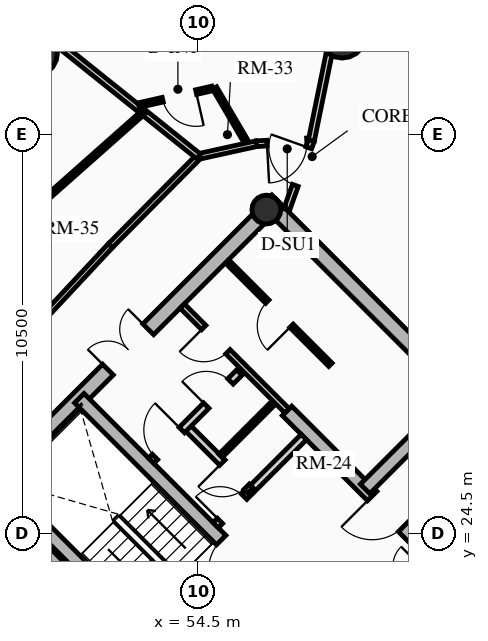
"""IFC4 building model, lengths in metres.
Left out: names, types, materials, properties, quantities, classifications, styles, units other than length and angle.
Written with IfcOpenShell. Run it as: python <this file> out.ifc"""

import sys

from ifc_helpers import new_model, si_unit, direction, frame, frame_2d, origin, origin_2d, place, context, subcontext, project, spatial, rectangle, circle, hollow_circle, extrude, source, transform, mapped, element, fill, save


model = new_model("IFC4")
c1 = context("Model", 3, precision=1e-05, world=origin(), true_north=direction((0.0, 1.0)))
c2 = subcontext(c1, "Body", "Model", "MODEL_VIEW")
j1 = project(units=[si_unit("LENGTHUNIT", "METRE"), si_unit("PLANEANGLEUNIT", "RADIAN")], contexts=[c1])
p1 = place(None, origin())
s1 = spatial("IfcSite", under=j1, at=p1, CompositionType="ELEMENT")
p2 = place(p1, origin())
s2 = spatial("IfcBuilding", under=s1, at=p2, CompositionType="ELEMENT")
p3 = place(p2, frame((0.0, 0.0, 169.06)))
s3 = spatial("IfcBuildingStorey", under=s2, at=p3, CompositionType="ELEMENT", Elevation=169.06)
for number, where, z_axis, x_axis in (
    (1, (58.702, 15.732, 0.0), (0.0, 0.0, 1.0), (-0.707, 0.707, 0.0)),
    (2, (66.268, 23.298, 0.0), (0.0, 0.0, 1.0), (-0.707, 0.707, 0.0)),
):
    element("IfcWall", number, at=place(p3, frame(where, z_axis=z_axis, x_axis=x_axis)), inside=s3, PredefinedType="SHEAR", context=c2, shape_type="SweptSolid", body=[
        extrude(rectangle(XDim=14.1, YDim=0.4, at=frame_2d((7.05, 0.0))), origin(), (0.0, 0.0, 1.0), 2.91),
    ])
p4 = place(p3, frame((48.873, 25.561, 0.0), z_axis=(0.0, 0.0, 1.0), x_axis=(0.707106781187, 0.707106781187, 0.0)))
e3 = element("IfcWall", 3, at=p4, inside=s3, PredefinedType="SHEAR", context=c2, shape_type="SweptSolid", body=[
    extrude(rectangle(XDim=10.7, YDim=0.4, at=frame_2d((5.35, 0.0))), origin(), (0.0, 0.0, 1.0), 2.91),
])
m1 = source(origin(), c2, "Body", "SweptSolid", [
    extrude(rectangle(XDim=1.5, YDim=2.02, at=frame_2d((0.75, 1.01))), frame((0.0, 0.21, 0.0), z_axis=(0.0, -1.0, 0.0), x_axis=(1.0, 0.0, 0.0)), (0.0, 0.0, 1.0), 0.42),
])
p5 = place(p4, frame((4.6, 0.0, 0.0)))
e4 = element("IfcOpeningElement", 4, at=p5, cuts=e3, PredefinedType="OPENING", context=c2, shape_type="MappedRepresentation", body=[
    mapped(m1, transform((0.0, 0.0, 0.0), x_axis=(1.0, 0.0, 0.0), y_axis=(0.0, 1.0, 0.0), z_axis=(0.0, 0.0, 1.0), scale=1.0)),
])
p6 = place(p3, frame((61.06, 18.373, 0.0), z_axis=(0.0, 0.0, 1.0), x_axis=(-0.707106781187, 0.707106781187, 0.0)))
e5 = element("IfcWall", 5, at=p6, inside=s3, PredefinedType="SHEAR", context=c2, shape_type="SweptSolid", body=[
    extrude(rectangle(XDim=13.7, YDim=0.35, at=frame_2d((6.85, 0.0))), origin(), (0.0, 0.0, 1.0), 2.91),
])
m2 = source(origin(), c2, "Body", "SweptSolid", [
    extrude(rectangle(XDim=1.1, YDim=2.015, at=frame_2d((0.55, 1.007))), frame((0.0, 0.185, 0.0), z_axis=(0.0, -1.0, 0.0), x_axis=(1.0, 0.0, 0.0)), (0.0, 0.0, 1.0), 0.37),
])
p7 = place(p6, frame((4.85, 0.0, 0.0)))
e6 = element("IfcOpeningElement", 6, at=p7, cuts=e5, PredefinedType="OPENING", context=c2, shape_type="MappedRepresentation", body=[
    mapped(m2, transform((0.0, 0.0, 0.0), x_axis=(1.0, 0.0, 0.0), y_axis=(0.0, 1.0, 0.0), z_axis=(0.0, 0.0, 1.0), scale=1.0)),
])
p8 = place(p6, frame((0.625, 0.0, 0.0)))
e7 = element("IfcOpeningElement", 7, at=p8, cuts=e5, PredefinedType="OPENING", context=c2, shape_type="MappedRepresentation", body=[
    mapped(m2, transform((0.0, 0.0, 0.0), x_axis=(1.0, 0.0, 0.0), y_axis=(0.0, 1.0, 0.0), z_axis=(0.0, 0.0, 1.0), scale=1.0)),
])
p9 = place(p6, frame((2.625, 0.0, 0.0)))
e8 = element("IfcOpeningElement", 8, at=p9, cuts=e5, PredefinedType="OPENING", context=c2, shape_type="MappedRepresentation", body=[
    mapped(m2, transform((0.0, 0.0, 0.0), x_axis=(1.0, 0.0, 0.0), y_axis=(0.0, 1.0, 0.0), z_axis=(0.0, 0.0, 1.0), scale=1.0)),
])
m3 = source(origin(), c2, "Body", "SweptSolid", [
    extrude(rectangle(XDim=1.15, YDim=2.02, at=frame_2d((0.575, 1.01))), frame((0.0, 0.185, 0.0), z_axis=(0.0, -1.0, 0.0), x_axis=(1.0, 0.0, 0.0)), (0.0, 0.0, 1.0), 0.37),
])
p10 = place(p6, frame((7.27, 0.0, 0.0)))
e9 = element("IfcOpeningElement", 9, at=p10, cuts=e5, PredefinedType="OPENING", context=c2, shape_type="MappedRepresentation", body=[
    mapped(m3, transform((0.0, 0.0, 0.0), x_axis=(1.0, 0.0, 0.0), y_axis=(0.0, 1.0, 0.0), z_axis=(0.0, 0.0, 1.0), scale=1.0)),
])
p11 = place(p3, frame((63.627, 20.94, 0.0), z_axis=(0.0, 0.0, 1.0), x_axis=(-0.707119496762, 0.707094065383, 0.0)))
e10 = element("IfcWall", 10, at=p11, inside=s3, PredefinedType="SHEAR", context=c2, shape_type="SweptSolid", body=[
    extrude(rectangle(XDim=9.6, YDim=0.35, at=frame_2d((4.8, 0.0))), origin(), (0.0, 0.0, 1.0), 2.91),
])
p12 = place(p11, frame((5.28, 0.0, 0.0)))
e11 = element("IfcOpeningElement", 11, at=p12, cuts=e10, PredefinedType="OPENING", context=c2, shape_type="MappedRepresentation", body=[
    mapped(m3, transform((0.0, 0.0, 0.0), x_axis=(1.0, 0.0, 0.0), y_axis=(0.0, 1.0, 0.0), z_axis=(0.0, 0.0, 1.0), scale=1.0)),
])
p13 = place(p3, frame((53.922, 21.141, 0.0), z_axis=(0.0, 0.0, 1.0), x_axis=(-0.707106781187, 0.707106781187, 0.0)))
e12 = element("IfcWall", 12, at=p13, inside=s3, PredefinedType="SHEAR", context=c2, shape_type="SweptSolid", body=[
    extrude(rectangle(XDim=6.695, YDim=0.35, at=frame_2d((3.348, 0.0))), origin(), (0.0, 0.0, 1.0), 2.91),
])
p14 = place(p3, frame((58.893, 25.674, 0.0), z_axis=(0.0, 0.0, 1.0), x_axis=(0.707106781187, 0.707106781187, 0.0)))
e13 = element("IfcWall", 13, at=p14, inside=s3, PredefinedType="SHEAR", context=c2, shape_type="SweptSolid", body=[
    extrude(rectangle(XDim=3.285, YDim=0.35, at=frame_2d((1.643, 0.0))), origin(), (0.0, 0.0, 1.0), 2.91),
])
p15 = place(p3, frame((56.294, 33.024, 0.0), z_axis=(0.0, 0.0, 1.0), x_axis=(0.707106781187, 0.707106781187, 0.0)))
e14 = element("IfcColumn", 14, at=p15, inside=s3, PredefinedType="COLUMN", context=c2, shape_type="SweptSolid", body=[
    extrude(hollow_circle(Radius=0.38, WallThickness=0.032, at=origin_2d()), origin(), (0.0, 0.0, 1.0), 2.91),
])
for number, where, z_axis, x_axis in (
    (15, (58.291, 37.635, 0.0), (0.0, 0.0, 1.0), (1.0, 0.0, 0.0)),
    (16, (50.173, 37.146, 0.0), (0.0, 0.0, 1.0), (1.0, 0.0, 0.0)),
):
    element("IfcColumn", number, at=place(p3, frame(where, z_axis=z_axis, x_axis=x_axis)), inside=s3, PredefinedType="USERDEFINED", context=c2, shape_type="SweptSolid", body=[
        extrude(circle(Radius=0.625, at=origin_2d()), origin(), (0.0, 0.0, 1.0), 2.91),
    ])
p16 = place(p3, frame((58.214, 21.467, 0.0), z_axis=(0.0, 0.0, 1.0), x_axis=(0.707106781187, 0.707106781187, 0.0)))
e17 = element("IfcWall", 17, at=p16, inside=s3, PredefinedType="PARTITIONING", context=c2, shape_type="SweptSolid", body=[
    extrude(rectangle(XDim=3.28, YDim=0.2, at=frame_2d((1.64, 0.0))), origin(), (0.0, 0.0, 1.0), 2.675),
])
m4 = source(origin(), c2, "Body", "SweptSolid", [
    extrude(rectangle(XDim=1.5, YDim=2.02, at=frame_2d((0.75, 1.01))), frame((0.0, 0.11, 0.0), z_axis=(0.0, -1.0, 0.0), x_axis=(1.0, 0.0, 0.0)), (0.0, 0.0, 1.0), 0.22),
])
p17 = place(p16, frame((1.55, 0.0, 0.0)))
e18 = element("IfcOpeningElement", 18, at=p17, cuts=e17, PredefinedType="OPENING", context=c2, shape_type="MappedRepresentation", body=[
    mapped(m4, transform((0.0, 0.0, 0.0), x_axis=(1.0, 0.0, 0.0), y_axis=(0.0, 1.0, 0.0), z_axis=(0.0, 0.0, 1.0), scale=1.0)),
])
p18 = place(p3, frame((54.961, 24.719, 0.0), z_axis=(0.0, 0.0, 1.0), x_axis=(0.707106781187, 0.707106781187, 0.0)))
e19 = element("IfcWall", 19, at=p18, inside=s3, PredefinedType="PARTITIONING", context=c2, shape_type="SweptSolid", body=[
    extrude(rectangle(XDim=3.28, YDim=0.2, at=frame_2d((1.64, 0.0))), origin(), (0.0, 0.0, 1.0), 2.675),
])
m5 = source(origin(), c2, "Body", "SweptSolid", [
    extrude(rectangle(XDim=0.9, YDim=2.005, at=frame_2d((0.45, 1.002))), frame((0.0, 0.11, 0.0), z_axis=(0.0, -1.0, 0.0), x_axis=(1.0, 0.0, 0.0)), (0.0, 0.0, 1.0), 0.22),
])
p19 = place(p18, frame((0.16, 0.0, 0.0)))
e20 = element("IfcOpeningElement", 20, at=p19, cuts=e19, PredefinedType="OPENING", context=c2, shape_type="MappedRepresentation", body=[
    mapped(m5, transform((0.0, 0.0, 0.0), x_axis=(1.0, 0.0, 0.0), y_axis=(0.0, 1.0, 0.0), z_axis=(0.0, 0.0, 1.0), scale=1.0)),
])
p20 = place(p3, frame((55.874, 25.631, 0.0), z_axis=(0.0, 0.0, 1.0), x_axis=(-0.707157639372, 0.707055919343, 0.0)))
e21 = element("IfcWall", 21, at=p20, inside=s3, PredefinedType="PARTITIONING", context=c2, shape_type="SweptSolid", body=[
    extrude(rectangle(XDim=2.4, YDim=0.2, at=frame_2d((1.2, 0.0))), origin(), (0.0, 0.0, 1.0), 2.675),
])
p21 = place(p20, frame((0.14, 0.0, 0.0)))
e22 = element("IfcOpeningElement", 22, at=p21, cuts=e21, PredefinedType="OPENING", context=c2, shape_type="MappedRepresentation", body=[
    mapped(m5, transform((0.0, 0.0, 0.0), x_axis=(1.0, 0.0, 0.0), y_axis=(0.0, 1.0, 0.0), z_axis=(0.0, 0.0, 1.0), scale=1.0)),
])
p22 = place(p3, frame((53.264, 26.416, 0.0), z_axis=(0.0, 0.0, 1.0), x_axis=(0.707106781187, 0.707106781187, 0.0)))
e23 = element("IfcWall", 23, at=p22, inside=s3, PredefinedType="PARTITIONING", context=c2, shape_type="SweptSolid", body=[
    extrude(rectangle(XDim=3.28, YDim=0.2, at=frame_2d((1.64, 0.0))), origin(), (0.0, 0.0, 1.0), 2.675),
])
m6 = source(origin(), c2, "Body", "SweptSolid", [
    extrude(rectangle(XDim=1.0, YDim=2.015, at=frame_2d((0.5, 1.007))), frame((0.0, 0.11, 0.0), z_axis=(0.0, -1.0, 0.0), x_axis=(1.0, 0.0, 0.0)), (0.0, 0.0, 1.0), 0.22),
])
p23 = place(p22, frame((0.14, 0.0, 0.0)))
e24 = element("IfcOpeningElement", 24, at=p23, cuts=e23, PredefinedType="OPENING", context=c2, shape_type="MappedRepresentation", body=[
    mapped(m6, transform((0.0, 0.0, 0.0), x_axis=(1.0, 0.0, 0.0), y_axis=(0.0, 1.0, 0.0), z_axis=(0.0, 0.0, 1.0), scale=1.0)),
])
p24 = place(p22, frame((2.05, 0.0, 0.0)))
e25 = element("IfcOpeningElement", 25, at=p24, cuts=e23, PredefinedType="OPENING", context=c2, shape_type="MappedRepresentation", body=[
    mapped(m5, transform((0.0, 0.0, 0.0), x_axis=(1.0, 0.0, 0.0), y_axis=(0.0, 1.0, 0.0), z_axis=(0.0, 0.0, 1.0), scale=1.0)),
])
p25 = place(p3, frame((55.089, 26.543, 0.0), z_axis=(0.0, 0.0, 1.0), x_axis=(0.707106781187, 0.707106781187, 0.0)))
e26 = element("IfcWall", 26, at=p25, inside=s3, PredefinedType="PARTITIONING", context=c2, shape_type="SweptSolid", body=[
    extrude(rectangle(XDim=1.88, YDim=0.125, at=frame_2d((0.94, 0.0))), origin(), (0.0, 0.0, 1.0), 2.675),
])
p26 = place(p3, frame((56.839, 27.728, 0.0), z_axis=(0.0, 0.0, 1.0), x_axis=(-0.707106781187, 0.707106781187, 0.0)))
e27 = element("IfcWall", 27, at=p26, inside=s3, PredefinedType="PARTITIONING", context=c2, shape_type="SweptSolid", body=[
    extrude(rectangle(XDim=3.9, YDim=0.16, at=frame_2d((1.95, 0.0))), origin(), (0.0, 0.0, 1.0), 2.675),
])
m7 = source(origin(), c2, "Body", "SweptSolid", [
    extrude(rectangle(XDim=0.9, YDim=2.005, at=frame_2d((0.45, 1.002))), frame((0.0, 0.09, 0.0), z_axis=(0.0, -1.0, 0.0), x_axis=(1.0, 0.0, 0.0)), (0.0, 0.0, 1.0), 0.18),
])
p27 = place(p26, frame((2.2, 0.0, 0.0)))
e28 = element("IfcOpeningElement", 28, at=p27, cuts=e27, PredefinedType="OPENING", context=c2, shape_type="MappedRepresentation", body=[
    mapped(m7, transform((0.0, 0.0, 0.0), x_axis=(1.0, 0.0, 0.0), y_axis=(0.0, 1.0, 0.0), z_axis=(0.0, 0.0, 1.0), scale=1.0)),
])
p28 = place(p3, frame((57.981, 28.941, 0.0), z_axis=(0.0, 0.0, 1.0), x_axis=(-0.707074823725, 0.707138737204, 0.0)))
e29 = element("IfcWall", 29, at=p28, inside=s3, PredefinedType="PARTITIONING", context=c2, shape_type="SweptSolid", body=[
    extrude(rectangle(XDim=3.82, YDim=0.125, at=frame_2d((1.91, 0.0))), origin(), (0.0, 0.0, 1.0), 2.675),
])
m8 = source(origin(), c2, "Body", "SweptSolid", [
    extrude(rectangle(XDim=0.9, YDim=2.005, at=frame_2d((0.45, 1.002))), frame((0.0, 0.073, 0.0), z_axis=(0.0, -1.0, 0.0), x_axis=(1.0, 0.0, 0.0)), (0.0, 0.0, 1.0), 0.145),
])
p29 = place(p28, frame((1.45, 0.0, 0.0)))
e30 = element("IfcOpeningElement", 30, at=p29, cuts=e29, PredefinedType="OPENING", context=c2, shape_type="MappedRepresentation", body=[
    mapped(m8, transform((0.0, 0.0, 0.0), x_axis=(1.0, 0.0, 0.0), y_axis=(0.0, 1.0, 0.0), z_axis=(0.0, 0.0, 1.0), scale=1.0)),
])
p30 = place(p3, frame((57.478, 34.838, 0.0), z_axis=(0.0, 0.0, 1.0), x_axis=(-0.998448388303, -0.05568497011, 0.0)))
e31 = element("IfcWall", 31, at=p30, inside=s3, PredefinedType="PARTITIONING", context=c2, shape_type="SweptSolid", body=[
    extrude(rectangle(XDim=1.447, YDim=0.15, at=frame_2d((0.723, 0.0))), origin(), (0.0, 0.0, 1.0), 2.245),
])
m9 = source(origin(), c2, "Body", "SweptSolid", [
    extrude(rectangle(XDim=1.05, YDim=2.015, at=frame_2d((0.525, 1.007))), frame((0.0, 0.085, 0.0), z_axis=(0.0, -1.0, 0.0), x_axis=(1.0, 0.0, 0.0)), (0.0, 0.0, 1.0), 0.17),
])
p31 = place(p30, frame((0.12, 0.0, 0.0)))
e32 = element("IfcOpeningElement", 32, at=p31, cuts=e31, PredefinedType="OPENING", context=c2, shape_type="MappedRepresentation", body=[
    mapped(m9, transform((0.0, 0.0, 0.0), x_axis=(1.0, 0.0, 0.0), y_axis=(0.0, 1.0, 0.0), z_axis=(0.0, 0.0, 1.0), scale=1.0)),
])
p32 = place(p3, frame((56.033, 34.757, 0.0), z_axis=(0.0, 0.0, 1.0), x_axis=(-0.976507263775, -0.215484486204, 0.0)))
e33 = element("IfcWall", 33, at=p32, inside=s3, PredefinedType="PARTITIONING", context=c2, shape_type="SweptSolid", body=[
    extrude(rectangle(XDim=1.556, YDim=0.15, at=frame_2d((0.778, 0.0))), origin(), (0.0, 0.0, 1.0), 2.245),
])
p33 = place(p3, frame((54.514, 34.422, 0.0), z_axis=(0.0, 0.0, 1.0), x_axis=(-0.703289573518, -0.710903492593, 0.0)))
e34 = element("IfcWall", 34, at=p33, inside=s3, PredefinedType="PARTITIONING", context=c2, shape_type="SweptSolid", body=[
    extrude(rectangle(XDim=3.303, YDim=0.15, at=frame_2d((1.651, 0.0))), origin(), (0.0, 0.0, 1.0), 2.245),
])
p34 = place(p3, frame((52.191, 32.074, 0.0), z_axis=(0.0, 0.0, 1.0), x_axis=(-0.682404362608, -0.730974887321, 0.0)))
e35 = element("IfcWall", 35, at=p34, inside=s3, PredefinedType="PARTITIONING", context=c2, shape_type="SweptSolid", body=[
    extrude(rectangle(XDim=6.364, YDim=0.15, at=frame_2d((3.182, 0.0))), origin(), (0.0, 0.0, 1.0), 2.245),
])
p35 = place(p3, frame((57.478, 34.838, 0.0), z_axis=(0.0, 0.0, 1.0), x_axis=(0.200272806445, 0.979740171167, 0.0)))
e36 = element("IfcWall", 36, at=p35, inside=s3, PredefinedType="PARTITIONING", context=c2, shape_type="SweptSolid", body=[
    extrude(rectangle(XDim=4.358, YDim=0.16, at=frame_2d((2.179, 0.0))), origin(), (0.0, 0.0, 1.0), 2.245),
])
p36 = place(p3, frame((54.514, 34.422, 0.0), z_axis=(0.0, 0.0, 1.0), x_axis=(-0.780385234796, 0.625299036712, 0.0)))
e37 = element("IfcWall", 37, at=p36, inside=s3, PredefinedType="PARTITIONING", context=c2, shape_type="SweptSolid", body=[
    extrude(rectangle(XDim=6.653, YDim=0.16, at=frame_2d((3.326, 0.0))), origin(), (0.0, 0.0, 1.0), 2.245),
])
p37 = place(p3, frame((56.828, 33.021, 0.0), z_axis=(0.0, 0.0, 1.0), x_axis=(0.336608838259, 0.941644566705, 0.0)))
e38 = element("IfcWall", 38, at=p37, inside=s3, PredefinedType="PARTITIONING", context=c2, shape_type="SweptSolid", body=[
    extrude(rectangle(XDim=1.93, YDim=0.16, at=frame_2d((0.965, 0.0))), origin(), (0.0, 0.0, 1.0), 2.245),
])
m10 = source(origin(), c2, "Body", "SweptSolid", [
    extrude(rectangle(XDim=1.05, YDim=2.015, at=frame_2d((0.525, 1.007))), frame((0.0, 0.09, 0.0), z_axis=(0.0, -1.0, 0.0), x_axis=(1.0, 0.0, 0.0)), (0.0, 0.0, 1.0), 0.18),
])
p38 = place(p37, frame((0.68, 0.0, 0.0)))
e39 = element("IfcOpeningElement", 39, at=p38, cuts=e38, PredefinedType="OPENING", context=c2, shape_type="MappedRepresentation", body=[
    mapped(m10, transform((0.0, 0.0, 0.0), x_axis=(1.0, 0.0, 0.0), y_axis=(0.0, 1.0, 0.0), z_axis=(0.0, 0.0, 1.0), scale=1.0)),
])
p39 = place(p3, frame((55.737, 34.853, 0.0), z_axis=(0.0, 0.0, 1.0), x_axis=(-0.506282425857, 0.862367732043, 0.0)))
e40 = element("IfcWall", 40, at=p39, inside=s3, PredefinedType="PARTITIONING", context=c2, shape_type="SweptSolid", body=[
    extrude(rectangle(XDim=1.591, YDim=0.125, at=frame_2d((0.796, 0.0))), origin(), (0.0, 0.0, 1.0), 2.245),
])
p40 = place(p3, frame((54.871, 36.211, 0.0), z_axis=(0.0, 0.0, 1.0), x_axis=(-0.975212623293, -0.221269833846, 0.0)))
e41 = element("IfcWall", 41, at=p40, inside=s3, PredefinedType="PARTITIONING", context=c2, shape_type="SweptSolid", body=[
    extrude(rectangle(XDim=1.983, YDim=0.125, at=frame_2d((0.991, 0.0))), origin(), (0.0, 0.0, 1.0), 2.312),
])
p41 = place(p40, frame((0.436, 0.0, 0.0)))
e42 = element("IfcOpeningElement", 42, at=p41, cuts=e41, PredefinedType="OPENING", context=c2, shape_type="MappedRepresentation", body=[
    mapped(m8, transform((0.0, 0.0, 0.0), x_axis=(1.0, 0.0, 0.0), y_axis=(0.0, 1.0, 0.0), z_axis=(0.0, 0.0, 1.0), scale=1.0)),
])
p42 = place(p3, frame((53.06, 35.587, 0.0), z_axis=(0.0, 0.0, 1.0), x_axis=(-0.748390346028, -0.663258539314, 0.0)))
e43 = element("IfcWall", 43, at=p42, inside=s3, PredefinedType="PARTITIONING", context=c2, shape_type="SweptSolid", body=[
    extrude(rectangle(XDim=3.553, YDim=0.125, at=frame_2d((1.777, 0.0))), origin(), (0.0, 0.0, 1.0), 2.245),
])
m11 = source(origin(), c2, "Body", "SweptSolid", [
    extrude(rectangle(XDim=1.15, YDim=2.02, at=frame_2d((0.575, 1.01))), frame((0.0, 0.025, 0.0), z_axis=(0.0, -1.0, 0.0), x_axis=(1.0, 0.0, 0.0)), (0.0, 0.0, 1.0), 0.05),
])
p43 = place(p10, origin())
e44 = element("IfcDoor", 44, at=p43, inside=s3, OperationType="SINGLE_SWING_LEFT", PredefinedType="DOOR", context=c2, shape_type="MappedRepresentation", body=[
    mapped(m11, transform((0.0, 0.0, 0.0), x_axis=(1.0, 0.0, 0.0), y_axis=(0.0, 1.0, 0.0), z_axis=(0.0, 0.0, 1.0), scale=1.0)),
])
fill(e9, e44)
p44 = place(p12, origin())
e45 = element("IfcDoor", 45, at=p44, inside=s3, OperationType="SINGLE_SWING_RIGHT", PredefinedType="DOOR", context=c2, shape_type="MappedRepresentation", body=[
    mapped(m11, transform((0.0, 0.0, 0.0), x_axis=(1.0, 0.0, 0.0), y_axis=(0.0, 1.0, 0.0), z_axis=(0.0, 0.0, 1.0), scale=1.0)),
])
fill(e11, e45)
m12 = source(origin(), c2, "Body", "SweptSolid", [
    extrude(rectangle(XDim=1.5, YDim=2.02, at=frame_2d((0.75, 1.01))), frame((0.0, 0.025, 0.0), z_axis=(0.0, -1.0, 0.0), x_axis=(1.0, 0.0, 0.0)), (0.0, 0.0, 1.0), 0.05),
])
p45 = place(p5, origin())
e46 = element("IfcDoor", 46, at=p45, inside=s3, OperationType="DOUBLE_DOOR_SINGLE_SWING", PredefinedType="DOOR", context=c2, shape_type="MappedRepresentation", body=[
    mapped(m12, transform((0.0, 0.0, 0.0), x_axis=(1.0, 0.0, 0.0), y_axis=(0.0, 1.0, 0.0), z_axis=(0.0, 0.0, 1.0), scale=1.0)),
])
fill(e4, e46)
m13 = source(origin(), c2, "Body", "SweptSolid", [
    extrude(rectangle(XDim=0.9, YDim=2.005, at=frame_2d((0.45, 1.002))), frame((0.0, 0.025, 0.0), z_axis=(0.0, -1.0, 0.0), x_axis=(1.0, 0.0, 0.0)), (0.0, 0.0, 1.0), 0.05),
])
p46 = place(p19, origin())
e47 = element("IfcDoor", 47, at=p46, inside=s3, OperationType="SINGLE_SWING_LEFT", PredefinedType="DOOR", context=c2, shape_type="MappedRepresentation", body=[
    mapped(m13, transform((0.0, 0.0, 0.0), x_axis=(1.0, 0.0, 0.0), y_axis=(0.0, 1.0, 0.0), z_axis=(0.0, 0.0, 1.0), scale=1.0)),
])
fill(e20, e47)
m14 = source(origin(), c2, "Body", "SweptSolid", [
    extrude(rectangle(XDim=1.0, YDim=2.015, at=frame_2d((0.5, 1.007))), frame((0.0, 0.025, 0.0), z_axis=(0.0, -1.0, 0.0), x_axis=(1.0, 0.0, 0.0)), (0.0, 0.0, 1.0), 0.05),
])
p47 = place(p23, origin())
e48 = element("IfcDoor", 48, at=p47, inside=s3, OperationType="SINGLE_SWING_RIGHT", PredefinedType="DOOR", context=c2, shape_type="MappedRepresentation", body=[
    mapped(m14, transform((0.0, 0.0, 0.0), x_axis=(1.0, 0.0, 0.0), y_axis=(0.0, 1.0, 0.0), z_axis=(0.0, 0.0, 1.0), scale=1.0)),
])
fill(e24, e48)
p48 = place(p21, origin())
e49 = element("IfcDoor", 49, at=p48, inside=s3, OperationType="SINGLE_SWING_RIGHT", PredefinedType="DOOR", context=c2, shape_type="MappedRepresentation", body=[
    mapped(m13, transform((0.0, 0.0, 0.0), x_axis=(1.0, 0.0, 0.0), y_axis=(0.0, 1.0, 0.0), z_axis=(0.0, 0.0, 1.0), scale=1.0)),
])
fill(e22, e49)
p49 = place(p24, origin())
e50 = element("IfcDoor", 50, at=p49, inside=s3, OperationType="SINGLE_SWING_LEFT", PredefinedType="DOOR", context=c2, shape_type="MappedRepresentation", body=[
    mapped(m13, transform((0.0, 0.0, 0.0), x_axis=(1.0, 0.0, 0.0), y_axis=(0.0, 1.0, 0.0), z_axis=(0.0, 0.0, 1.0), scale=1.0)),
])
fill(e25, e50)
p50 = place(p27, origin())
e51 = element("IfcDoor", 51, at=p50, inside=s3, OperationType="SINGLE_SWING_RIGHT", PredefinedType="DOOR", context=c2, shape_type="MappedRepresentation", body=[
    mapped(m13, transform((0.0, 0.0, 0.0), x_axis=(1.0, 0.0, 0.0), y_axis=(0.0, 1.0, 0.0), z_axis=(0.0, 0.0, 1.0), scale=1.0)),
])
fill(e28, e51)
p51 = place(p29, origin())
e52 = element("IfcDoor", 52, at=p51, inside=s3, OperationType="SINGLE_SWING_LEFT", PredefinedType="DOOR", context=c2, shape_type="MappedRepresentation", body=[
    mapped(m13, transform((0.0, 0.0, 0.0), x_axis=(1.0, 0.0, 0.0), y_axis=(0.0, 1.0, 0.0), z_axis=(0.0, 0.0, 1.0), scale=1.0)),
])
fill(e30, e52)
m15 = source(origin(), c2, "Body", "SweptSolid", [
    extrude(rectangle(XDim=1.05, YDim=2.015, at=frame_2d((0.525, 1.007))), frame((0.0, 0.025, 0.0), z_axis=(0.0, -1.0, 0.0), x_axis=(1.0, 0.0, 0.0)), (0.0, 0.0, 1.0), 0.05),
])
p52 = place(p38, origin())
e53 = element("IfcDoor", 53, at=p52, inside=s3, OperationType="SINGLE_SWING_RIGHT", PredefinedType="DOOR", context=c2, shape_type="MappedRepresentation", body=[
    mapped(m15, transform((0.0, 0.0, 0.0), x_axis=(1.0, 0.0, 0.0), y_axis=(0.0, 1.0, 0.0), z_axis=(0.0, 0.0, 1.0), scale=1.0)),
])
fill(e39, e53)
p53 = place(p31, origin())
e54 = element("IfcDoor", 54, at=p53, inside=s3, OperationType="SINGLE_SWING_RIGHT", PredefinedType="DOOR", context=c2, shape_type="MappedRepresentation", body=[
    mapped(m15, transform((0.0, 0.0, 0.0), x_axis=(1.0, 0.0, 0.0), y_axis=(0.0, 1.0, 0.0), z_axis=(0.0, 0.0, 1.0), scale=1.0)),
])
fill(e32, e54)
p54 = place(p41, origin())
e55 = element("IfcDoor", 55, at=p54, inside=s3, OperationType="SINGLE_SWING_LEFT", PredefinedType="DOOR", context=c2, shape_type="MappedRepresentation", body=[
    mapped(m13, transform((0.0, 0.0, 0.0), x_axis=(1.0, 0.0, 0.0), y_axis=(0.0, 1.0, 0.0), z_axis=(0.0, 0.0, 1.0), scale=1.0)),
])
fill(e42, e55)
save(model, sys.argv[1])
